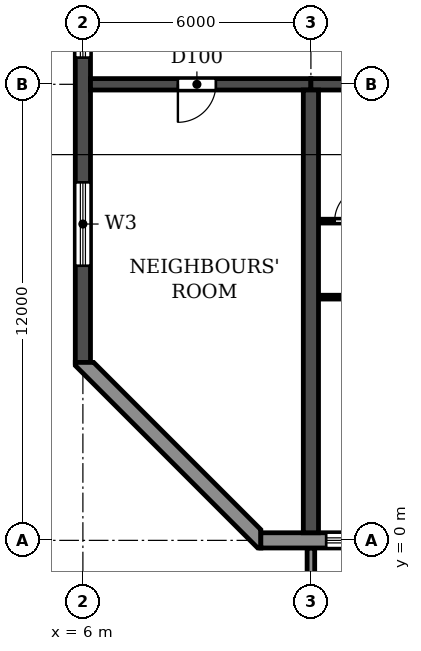
"""IFC4 building model, lengths in metres.
Left out: names, types, materials, properties, quantities, classifications, styles, units other than length and angle.
Written with IfcOpenShell. Run it as: python <this file> out.ifc"""

import sys

from ifc_helpers import new_model, si_unit, direction, frame, frame_2d, origin, place, context, subcontext, project, spatial, polyline, rectangle, outline, extrude, source, transform, mapped, element, fill, save


model = new_model("IFC4")
c1 = context("Model", 3, precision=1e-05, world=origin(), true_north=direction((0.0, 1.0)))
c2 = subcontext(c1, "Body", "Model", "MODEL_VIEW")
j1 = project(units=[si_unit("LENGTHUNIT", "METRE"), si_unit("PLANEANGLEUNIT", "RADIAN")], contexts=[c1])
p1 = place(None, origin())
s1 = spatial("IfcSite", under=j1, at=p1, CompositionType="ELEMENT")
p2 = place(p1, origin())
s2 = spatial("IfcBuilding", under=s1, at=p2, CompositionType="ELEMENT")
p3 = place(p2, frame((0.0, 0.0, 56.4)))
s3 = spatial("IfcBuildingStorey", under=s2, at=p3, CompositionType="ELEMENT", Elevation=56.4)
p4 = place(p3, frame((12.0, 0.2, 0.0), z_axis=(0.0, 0.0, 1.0), x_axis=(0.0, 1.0, 0.0)))
e1 = element("IfcWall", 1, at=p4, inside=s3, PredefinedType="SHEAR", context=c2, shape_type="SweptSolid", body=[
    extrude(rectangle(XDim=11.65, YDim=0.4, at=frame_2d((5.825, 0.0))), origin(), (0.0, 0.0, 1.0), 3.05),
])
p5 = place(p3, frame((6.0, 4.683, 0.0), z_axis=(0.0, 0.0, 1.0), x_axis=(0.0, 1.0, 0.0)))
e2 = element("IfcWall", 2, at=p5, inside=s3, PredefinedType="SHEAR", context=c2, shape_type="SweptSolid", body=[
    extrude(rectangle(XDim=35.434, YDim=0.4, at=frame_2d((17.717, 0.0))), origin(), (0.0, 0.0, 1.0), 3.05),
])
p6 = place(p5, frame((23.817, 0.0, 0.9)))
e3 = element("IfcOpeningElement", 3, at=p6, cuts=e2, PredefinedType="OPENING", context=c2, shape_type="SweptSolid", body=[
    extrude(rectangle(XDim=1.2, YDim=1.5, at=frame_2d((0.6, 0.75))), frame((0.0, 0.21, 0.0), z_axis=(0.0, -1.0, 0.0), x_axis=(1.0, 0.0, 0.0)), (0.0, 0.0, 1.0), 0.42),
])
p7 = place(p5, frame((8.017, 0.0, 0.9)))
e4 = element("IfcOpeningElement", 4, at=p7, cuts=e2, PredefinedType="OPENING", context=c2, shape_type="SweptSolid", body=[
    extrude(rectangle(XDim=1.2, YDim=1.5, at=frame_2d((0.6, 0.75))), frame((0.0, 0.21, 0.0), z_axis=(0.0, -1.0, 0.0), x_axis=(1.0, 0.0, 0.0)), (0.0, 0.0, 1.0), 0.42),
])
p8 = place(p5, frame((15.917, 0.0, 0.9)))
e5 = element("IfcOpeningElement", 5, at=p8, cuts=e2, PredefinedType="OPENING", context=c2, shape_type="SweptSolid", body=[
    extrude(rectangle(XDim=1.2, YDim=1.5, at=frame_2d((0.6, 0.75))), frame((0.0, 0.21, 0.0), z_axis=(0.0, -1.0, 0.0), x_axis=(1.0, 0.0, 0.0)), (0.0, 0.0, 1.0), 0.42),
])
p9 = place(p5, frame((29.493, 0.0, 0.6)))
e6 = element("IfcOpeningElement", 6, at=p9, cuts=e2, PredefinedType="OPENING", context=c2, shape_type="SweptSolid", body=[
    extrude(rectangle(XDim=2.2, YDim=1.8, at=frame_2d((1.1, 0.9))), frame((0.0, 0.21, 0.0), z_axis=(0.0, -1.0, 0.0), x_axis=(1.0, 0.0, 0.0)), (0.0, 0.0, 1.0), 0.42),
])
p10 = place(p5, frame((2.541, 0.0, 0.6)))
e7 = element("IfcOpeningElement", 7, at=p10, cuts=e2, PredefinedType="OPENING", context=c2, shape_type="SweptSolid", body=[
    extrude(rectangle(XDim=2.2, YDim=1.8, at=frame_2d((1.1, 0.9))), frame((0.0, 0.21, 0.0), z_axis=(0.0, -1.0, 0.0), x_axis=(1.0, 0.0, 0.0)), (0.0, 0.0, 1.0), 0.42),
])
p11 = place(p3, frame((6.2, 12.0, 0.0), z_axis=(0.0, 0.0, 1.0), x_axis=(1.0, 0.0, 0.0)))
e8 = element("IfcWall", 8, at=p11, inside=s3, PredefinedType="SHEAR", context=c2, shape_type="SweptSolid", body=[
    extrude(rectangle(XDim=5.8, YDim=0.3, at=frame_2d((2.9, 0.0))), origin(), (0.0, 0.0, 1.0), 2.45),
])
p12 = place(p11, frame((2.3, 0.0, 0.0)))
e9 = element("IfcOpeningElement", 9, at=p12, cuts=e8, PredefinedType="OPENING", context=c2, shape_type="SweptSolid", body=[
    extrude(rectangle(XDim=1.0, YDim=2.1, at=frame_2d((0.5, 1.05))), frame((0.0, 0.16, 0.0), z_axis=(0.0, -1.0, 0.0), x_axis=(1.0, 0.0, 0.0)), (0.0, 0.0, 1.0), 0.32),
])
p13 = place(p3, frame((12.0, 12.0, 0.0), z_axis=(0.0, 0.0, 1.0), x_axis=(1.0, 0.0, 0.0)))
e10 = element("IfcWall", 10, at=p13, inside=s3, PredefinedType="SHEAR", context=c2, shape_type="SweptSolid", body=[
    extrude(rectangle(XDim=6.0, YDim=0.3, at=frame_2d((3.0, 0.0))), origin(), (0.0, 0.0, 1.0), 2.45),
])
p14 = place(p13, frame((2.55, 0.0, 0.0)))
e11 = element("IfcOpeningElement", 11, at=p14, cuts=e10, PredefinedType="OPENING", context=c2, shape_type="SweptSolid", body=[
    extrude(rectangle(XDim=1.0, YDim=2.1, at=frame_2d((0.5, 1.05))), frame((0.0, 0.16, 0.0), z_axis=(0.0, -1.0, 0.0), x_axis=(1.0, 0.0, 0.0)), (0.0, 0.0, 1.0), 0.32),
])
p15 = place(p3, frame((10.683, 0.0, 0.0), z_axis=(0.0, 0.0, 1.0), x_axis=(1.0, 0.0, 0.0)))
e12 = element("IfcWall", 12, at=p15, inside=s3, PredefinedType="STANDARD", context=c2, shape_type="SweptSolid", body=[
    extrude(rectangle(XDim=80.634, YDim=0.4, at=frame_2d((40.317, 0.0))), origin(), (0.0, 0.0, 1.0), 3.05),
])
p16 = place(p15, frame((1.717, 0.0, 0.9)))
e13 = element("IfcOpeningElement", 13, at=p16, cuts=e12, PredefinedType="OPENING", context=c2, shape_type="SweptSolid", body=[
    extrude(rectangle(XDim=2.2, YDim=1.5, at=frame_2d((1.1, 0.75))), frame((0.0, 0.21, 0.0), z_axis=(0.0, -1.0, 0.0), x_axis=(1.0, 0.0, 0.0)), (0.0, 0.0, 1.0), 0.42),
])
p17 = place(p15, frame((4.917, 0.0, 0.0)))
e14 = element("IfcOpeningElement", 14, at=p17, cuts=e12, PredefinedType="OPENING", context=c2, shape_type="SweptSolid", body=[
    extrude(rectangle(XDim=1.8, YDim=2.4, at=frame_2d((0.9, 1.2))), frame((0.0, 0.21, 0.0), z_axis=(0.0, -1.0, 0.0), x_axis=(1.0, 0.0, 0.0)), (0.0, 0.0, 1.0), 0.42),
])
p18 = place(p15, frame((7.717, 0.0, 0.9)))
e15 = element("IfcOpeningElement", 15, at=p18, cuts=e12, PredefinedType="OPENING", context=c2, shape_type="SweptSolid", body=[
    extrude(rectangle(XDim=2.2, YDim=1.5, at=frame_2d((1.1, 0.75))), frame((0.0, 0.21, 0.0), z_axis=(0.0, -1.0, 0.0), x_axis=(1.0, 0.0, 0.0)), (0.0, 0.0, 1.0), 0.42),
])
p19 = place(p15, frame((10.717, 0.0, 0.9)))
e16 = element("IfcOpeningElement", 16, at=p19, cuts=e12, PredefinedType="OPENING", context=c2, shape_type="SweptSolid", body=[
    extrude(rectangle(XDim=2.2, YDim=1.5, at=frame_2d((1.1, 0.75))), frame((0.0, 0.21, 0.0), z_axis=(0.0, -1.0, 0.0), x_axis=(1.0, 0.0, 0.0)), (0.0, 0.0, 1.0), 0.42),
])
p20 = place(p15, frame((13.717, 0.0, 0.9)))
e17 = element("IfcOpeningElement", 17, at=p20, cuts=e12, PredefinedType="OPENING", context=c2, shape_type="SweptSolid", body=[
    extrude(rectangle(XDim=2.2, YDim=1.5, at=frame_2d((1.1, 0.75))), frame((0.0, 0.21, 0.0), z_axis=(0.0, -1.0, 0.0), x_axis=(1.0, 0.0, 0.0)), (0.0, 0.0, 1.0), 0.42),
])
p21 = place(p15, frame((16.917, 0.0, 0.0)))
e18 = element("IfcOpeningElement", 18, at=p21, cuts=e12, PredefinedType="OPENING", context=c2, shape_type="SweptSolid", body=[
    extrude(rectangle(XDim=1.8, YDim=2.4, at=frame_2d((0.9, 1.2))), frame((0.0, 0.21, 0.0), z_axis=(0.0, -1.0, 0.0), x_axis=(1.0, 0.0, 0.0)), (0.0, 0.0, 1.0), 0.42),
])
p22 = place(p15, frame((19.717, 0.0, 0.9)))
e19 = element("IfcOpeningElement", 19, at=p22, cuts=e12, PredefinedType="OPENING", context=c2, shape_type="SweptSolid", body=[
    extrude(rectangle(XDim=2.2, YDim=1.5, at=frame_2d((1.1, 0.75))), frame((0.0, 0.21, 0.0), z_axis=(0.0, -1.0, 0.0), x_axis=(1.0, 0.0, 0.0)), (0.0, 0.0, 1.0), 0.42),
])
p23 = place(p15, frame((22.717, 0.0, 0.9)))
e20 = element("IfcOpeningElement", 20, at=p23, cuts=e12, PredefinedType="OPENING", context=c2, shape_type="SweptSolid", body=[
    extrude(rectangle(XDim=2.2, YDim=1.5, at=frame_2d((1.1, 0.75))), frame((0.0, 0.21, 0.0), z_axis=(0.0, -1.0, 0.0), x_axis=(1.0, 0.0, 0.0)), (0.0, 0.0, 1.0), 0.42),
])
p24 = place(p15, frame((25.917, 0.0, 0.0)))
e21 = element("IfcOpeningElement", 21, at=p24, cuts=e12, PredefinedType="OPENING", context=c2, shape_type="SweptSolid", body=[
    extrude(rectangle(XDim=1.8, YDim=2.4, at=frame_2d((0.9, 1.2))), frame((0.0, 0.21, 0.0), z_axis=(0.0, -1.0, 0.0), x_axis=(1.0, 0.0, 0.0)), (0.0, 0.0, 1.0), 0.42),
])
p25 = place(p15, frame((28.717, 0.0, 0.9)))
e22 = element("IfcOpeningElement", 22, at=p25, cuts=e12, PredefinedType="OPENING", context=c2, shape_type="SweptSolid", body=[
    extrude(rectangle(XDim=2.2, YDim=1.5, at=frame_2d((1.1, 0.75))), frame((0.0, 0.21, 0.0), z_axis=(0.0, -1.0, 0.0), x_axis=(1.0, 0.0, 0.0)), (0.0, 0.0, 1.0), 0.42),
])
p26 = place(p15, frame((31.717, 0.0, 0.9)))
e23 = element("IfcOpeningElement", 23, at=p26, cuts=e12, PredefinedType="OPENING", context=c2, shape_type="SweptSolid", body=[
    extrude(rectangle(XDim=2.2, YDim=1.5, at=frame_2d((1.1, 0.75))), frame((0.0, 0.21, 0.0), z_axis=(0.0, -1.0, 0.0), x_axis=(1.0, 0.0, 0.0)), (0.0, 0.0, 1.0), 0.42),
])
p27 = place(p15, frame((34.717, 0.0, 0.9)))
e24 = element("IfcOpeningElement", 24, at=p27, cuts=e12, PredefinedType="OPENING", context=c2, shape_type="SweptSolid", body=[
    extrude(rectangle(XDim=2.2, YDim=1.5, at=frame_2d((1.1, 0.75))), frame((0.0, 0.21, 0.0), z_axis=(0.0, -1.0, 0.0), x_axis=(1.0, 0.0, 0.0)), (0.0, 0.0, 1.0), 0.42),
])
p28 = place(p15, frame((37.717, 0.0, 0.9)))
e25 = element("IfcOpeningElement", 25, at=p28, cuts=e12, PredefinedType="OPENING", context=c2, shape_type="SweptSolid", body=[
    extrude(rectangle(XDim=2.2, YDim=1.5, at=frame_2d((1.1, 0.75))), frame((0.0, 0.21, 0.0), z_axis=(0.0, -1.0, 0.0), x_axis=(1.0, 0.0, 0.0)), (0.0, 0.0, 1.0), 0.42),
])
p29 = place(p15, frame((40.917, 0.0, 0.0)))
e26 = element("IfcOpeningElement", 26, at=p29, cuts=e12, PredefinedType="OPENING", context=c2, shape_type="SweptSolid", body=[
    extrude(rectangle(XDim=1.8, YDim=2.4, at=frame_2d((0.9, 1.2))), frame((0.0, 0.21, 0.0), z_axis=(0.0, -1.0, 0.0), x_axis=(1.0, 0.0, 0.0)), (0.0, 0.0, 1.0), 0.42),
])
p30 = place(p15, frame((43.717, 0.0, 0.9)))
e27 = element("IfcOpeningElement", 27, at=p30, cuts=e12, PredefinedType="OPENING", context=c2, shape_type="SweptSolid", body=[
    extrude(rectangle(XDim=2.2, YDim=1.5, at=frame_2d((1.1, 0.75))), frame((0.0, 0.21, 0.0), z_axis=(0.0, -1.0, 0.0), x_axis=(1.0, 0.0, 0.0)), (0.0, 0.0, 1.0), 0.42),
])
p31 = place(p15, frame((46.717, 0.0, 0.9)))
e28 = element("IfcOpeningElement", 28, at=p31, cuts=e12, PredefinedType="OPENING", context=c2, shape_type="SweptSolid", body=[
    extrude(rectangle(XDim=2.2, YDim=1.5, at=frame_2d((1.1, 0.75))), frame((0.0, 0.21, 0.0), z_axis=(0.0, -1.0, 0.0), x_axis=(1.0, 0.0, 0.0)), (0.0, 0.0, 1.0), 0.42),
])
p32 = place(p15, frame((49.717, 0.0, 0.9)))
e29 = element("IfcOpeningElement", 29, at=p32, cuts=e12, PredefinedType="OPENING", context=c2, shape_type="SweptSolid", body=[
    extrude(rectangle(XDim=2.2, YDim=1.5, at=frame_2d((1.1, 0.75))), frame((0.0, 0.21, 0.0), z_axis=(0.0, -1.0, 0.0), x_axis=(1.0, 0.0, 0.0)), (0.0, 0.0, 1.0), 0.42),
])
p33 = place(p15, frame((52.717, 0.0, 0.9)))
e30 = element("IfcOpeningElement", 30, at=p33, cuts=e12, PredefinedType="OPENING", context=c2, shape_type="SweptSolid", body=[
    extrude(rectangle(XDim=2.2, YDim=1.5, at=frame_2d((1.1, 0.75))), frame((0.0, 0.21, 0.0), z_axis=(0.0, -1.0, 0.0), x_axis=(1.0, 0.0, 0.0)), (0.0, 0.0, 1.0), 0.42),
])
p34 = place(p15, frame((55.717, 0.0, 0.9)))
e31 = element("IfcOpeningElement", 31, at=p34, cuts=e12, PredefinedType="OPENING", context=c2, shape_type="SweptSolid", body=[
    extrude(rectangle(XDim=2.2, YDim=1.5, at=frame_2d((1.1, 0.75))), frame((0.0, 0.21, 0.0), z_axis=(0.0, -1.0, 0.0), x_axis=(1.0, 0.0, 0.0)), (0.0, 0.0, 1.0), 0.42),
])
p35 = place(p15, frame((58.717, 0.0, 0.9)))
e32 = element("IfcOpeningElement", 32, at=p35, cuts=e12, PredefinedType="OPENING", context=c2, shape_type="SweptSolid", body=[
    extrude(rectangle(XDim=2.2, YDim=1.5, at=frame_2d((1.1, 0.75))), frame((0.0, 0.21, 0.0), z_axis=(0.0, -1.0, 0.0), x_axis=(1.0, 0.0, 0.0)), (0.0, 0.0, 1.0), 0.42),
])
p36 = place(p15, frame((61.717, 0.0, 0.9)))
e33 = element("IfcOpeningElement", 33, at=p36, cuts=e12, PredefinedType="OPENING", context=c2, shape_type="SweptSolid", body=[
    extrude(rectangle(XDim=2.2, YDim=1.5, at=frame_2d((1.1, 0.75))), frame((0.0, 0.21, 0.0), z_axis=(0.0, -1.0, 0.0), x_axis=(1.0, 0.0, 0.0)), (0.0, 0.0, 1.0), 0.42),
])
p37 = place(p15, frame((64.917, 0.0, 0.0)))
e34 = element("IfcOpeningElement", 34, at=p37, cuts=e12, PredefinedType="OPENING", context=c2, shape_type="SweptSolid", body=[
    extrude(rectangle(XDim=1.8, YDim=2.4, at=frame_2d((0.9, 1.2))), frame((0.0, 0.21, 0.0), z_axis=(0.0, -1.0, 0.0), x_axis=(1.0, 0.0, 0.0)), (0.0, 0.0, 1.0), 0.42),
])
p38 = place(p15, frame((67.717, 0.0, 0.9)))
e35 = element("IfcOpeningElement", 35, at=p38, cuts=e12, PredefinedType="OPENING", context=c2, shape_type="SweptSolid", body=[
    extrude(rectangle(XDim=2.2, YDim=1.5, at=frame_2d((1.1, 0.75))), frame((0.0, 0.21, 0.0), z_axis=(0.0, -1.0, 0.0), x_axis=(1.0, 0.0, 0.0)), (0.0, 0.0, 1.0), 0.42),
])
p39 = place(p15, frame((70.717, 0.0, 0.9)))
e36 = element("IfcOpeningElement", 36, at=p39, cuts=e12, PredefinedType="OPENING", context=c2, shape_type="SweptSolid", body=[
    extrude(rectangle(XDim=2.2, YDim=1.5, at=frame_2d((1.1, 0.75))), frame((0.0, 0.21, 0.0), z_axis=(0.0, -1.0, 0.0), x_axis=(1.0, 0.0, 0.0)), (0.0, 0.0, 1.0), 0.42),
])
p40 = place(p15, frame((73.717, 0.0, 0.9)))
e37 = element("IfcOpeningElement", 37, at=p40, cuts=e12, PredefinedType="OPENING", context=c2, shape_type="SweptSolid", body=[
    extrude(rectangle(XDim=2.2, YDim=1.5, at=frame_2d((1.1, 0.75))), frame((0.0, 0.21, 0.0), z_axis=(0.0, -1.0, 0.0), x_axis=(1.0, 0.0, 0.0)), (0.0, 0.0, 1.0), 0.42),
])
p41 = place(p15, frame((76.917, 0.0, 0.0)))
e38 = element("IfcOpeningElement", 38, at=p41, cuts=e12, PredefinedType="OPENING", context=c2, shape_type="SweptSolid", body=[
    extrude(rectangle(XDim=1.8, YDim=2.4, at=frame_2d((0.9, 1.2))), frame((0.0, 0.21, 0.0), z_axis=(0.0, -1.0, 0.0), x_axis=(1.0, 0.0, 0.0)), (0.0, 0.0, 1.0), 0.42),
])
p42 = place(p3, origin())
e39 = element("IfcWall", 39, at=p42, inside=s3, PredefinedType="STANDARD", context=c2, shape_type="SweptSolid", body=[
    extrude(outline(polyline([(5.8, 4.683), (5.8, 4.6), (10.6, -0.2), (10.683, -0.2), (10.683, 0.283), (6.283, 4.683), (5.8, 4.683)])), origin(), (0.0, 0.0, 1.0), 3.05),
])
m1 = source(origin(), c2, "Body", "SweptSolid", [
    extrude(outline(polyline([(0.0, 0.0), (0.2, 0.0), (0.2, 1.65), (0.0, 1.65), (0.0, 0.0)])), origin(), (0.0, 0.0, 1.0), 3.1),
])
p43 = place(p3, frame((11.9, -1.85, 0.0)))
e40 = element("IfcWall", 40, at=p43, inside=s3, PredefinedType="STANDARD", context=c2, shape_type="MappedRepresentation", body=[
    mapped(m1, transform((0.0, 0.0, 0.0))),
])
p44 = place(p3, frame((12.21, 6.4, 0.0), z_axis=(0.0, 0.0, 1.0), x_axis=(1.0, 0.0, 0.0)))
e41 = element("IfcWall", 41, at=p44, inside=s3, PredefinedType="PARTITIONING", context=c2, shape_type="SweptSolid", body=[
    extrude(rectangle(XDim=2.84, YDim=0.1, at=frame_2d((1.42, 0.0))), origin(), (0.0, 0.0, 1.0), 3.05),
])
p45 = place(p44, frame((1.39, 0.0, 0.0)))
e42 = element("IfcOpeningElement", 42, at=p45, cuts=e41, PredefinedType="OPENING", context=c2, shape_type="SweptSolid", body=[
    extrude(rectangle(XDim=0.9, YDim=2.1, at=frame_2d((0.45, 1.05))), frame((0.0, 0.06, 0.0), z_axis=(0.0, -1.0, 0.0), x_axis=(1.0, 0.0, 0.0)), (0.0, 0.0, 1.0), 0.12),
])
p46 = place(p3, frame((12.21, 8.4, 0.0), z_axis=(0.0, 0.0, 1.0), x_axis=(1.0, 0.0, 0.0)))
e43 = element("IfcWall", 43, at=p46, inside=s3, PredefinedType="PARTITIONING", context=c2, shape_type="SweptSolid", body=[
    extrude(rectangle(XDim=1.99, YDim=0.1, at=frame_2d((0.995, 0.0))), origin(), (0.0, 0.0, 1.0), 3.05),
])
p47 = place(p46, frame((0.415, 0.0, 0.0)))
e44 = element("IfcOpeningElement", 44, at=p47, cuts=e43, PredefinedType="OPENING", context=c2, shape_type="SweptSolid", body=[
    extrude(rectangle(XDim=0.9, YDim=2.1, at=frame_2d((0.45, 1.05))), frame((0.0, 0.06, 0.0), z_axis=(0.0, -1.0, 0.0), x_axis=(1.0, 0.0, 0.0)), (0.0, 0.0, 1.0), 0.12),
])
p48 = place(p16, origin())
e45 = element("IfcWindow", 45, at=p48, inside=s3, PartitioningType="DOUBLE_PANEL_HORIZONTAL", PredefinedType="WINDOW", context=c2, shape_type="SweptSolid", body=[
    extrude(rectangle(XDim=2.2, YDim=1.5, at=frame_2d((1.1, 0.75))), frame((0.0, 0.03, 0.0), z_axis=(0.0, -1.0, 0.0), x_axis=(1.0, 0.0, 0.0)), (0.0, 0.0, 1.0), 0.06),
])
fill(e13, e45)
p49 = place(p7, origin())
e46 = element("IfcWindow", 46, at=p49, inside=s3, PartitioningType="SINGLE_PANEL", PredefinedType="WINDOW", context=c2, shape_type="SweptSolid", body=[
    extrude(rectangle(XDim=1.2, YDim=1.5, at=frame_2d((0.6, 0.75))), frame((0.0, 0.03, 0.0), z_axis=(0.0, -1.0, 0.0), x_axis=(1.0, 0.0, 0.0)), (0.0, 0.0, 1.0), 0.06),
])
fill(e4, e46)
p50 = place(p10, origin())
e47 = element("IfcWindow", 47, at=p50, inside=s3, PartitioningType="DOUBLE_PANEL_HORIZONTAL", PredefinedType="WINDOW", context=c2, shape_type="SweptSolid", body=[
    extrude(rectangle(XDim=2.2, YDim=1.8, at=frame_2d((1.1, 0.9))), frame((0.0, 0.03, 0.0), z_axis=(0.0, -1.0, 0.0), x_axis=(1.0, 0.0, 0.0)), (0.0, 0.0, 1.0), 0.06),
])
fill(e7, e47)
p51 = place(p12, frame((1.0, 0.0, 0.0), z_axis=(0.0, 0.0, 1.0), x_axis=(-1.0, 0.0, 0.0)))
e48 = element("IfcDoor", 48, at=p51, inside=s3, OperationType="SINGLE_SWING_RIGHT", PredefinedType="DOOR", context=c2, shape_type="SweptSolid", body=[
    extrude(rectangle(XDim=1.0, YDim=2.1, at=frame_2d((0.5, 1.05))), frame((0.0, 0.025, 0.0), z_axis=(0.0, -1.0, 0.0), x_axis=(1.0, 0.0, 0.0)), (0.0, 0.0, 1.0), 0.05),
])
fill(e9, e48)
p52 = place(p47, origin())
e49 = element("IfcDoor", 49, at=p52, inside=s3, OperationType="SINGLE_SWING_RIGHT", PredefinedType="DOOR", context=c2, shape_type="SweptSolid", body=[
    extrude(rectangle(XDim=0.9, YDim=2.1, at=frame_2d((0.45, 1.05))), frame((0.0, 0.025, 0.0), z_axis=(0.0, -1.0, 0.0), x_axis=(1.0, 0.0, 0.0)), (0.0, 0.0, 1.0), 0.05),
])
fill(e44, e49)
save(model, sys.argv[1])
